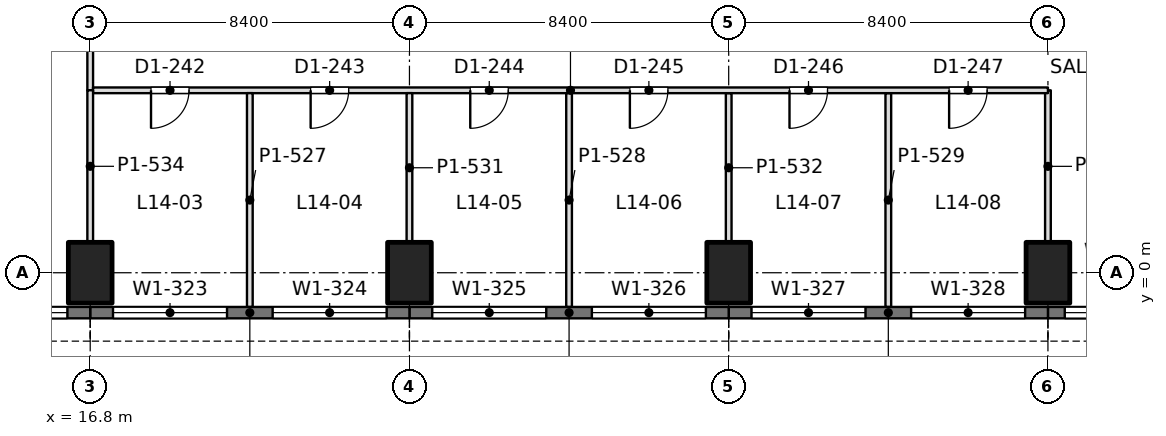
"""IFC4 building model, lengths in metres.
Left out: names, types, materials, properties, quantities, classifications, styles, units other than length and angle.
Written with IfcOpenShell. Run it as: python <this file> out.ifc"""

import sys

from ifc_helpers import new_model, si_unit, direction, frame, frame_2d, origin, origin_2d, place, context, subcontext, project, spatial, rectangle, extrude, element, fill, save


model = new_model("IFC4")
c1 = context("Model", 3, precision=1e-05, world=origin(), true_north=direction((0.0, 1.0)))
c2 = subcontext(c1, "Body", "Model", "MODEL_VIEW")
j1 = project(units=[si_unit("LENGTHUNIT", "METRE"), si_unit("PLANEANGLEUNIT", "RADIAN")], contexts=[c1])
p1 = place(None, origin())
s1 = spatial("IfcSite", under=j1, at=p1, CompositionType="ELEMENT")
p2 = place(p1, origin())
s2 = spatial("IfcBuilding", under=s1, at=p2, CompositionType="ELEMENT")
p3 = place(p2, frame((0.0, 0.0, 63.9)))
s3 = spatial("IfcBuildingStorey", under=s2, at=p3, CompositionType="ELEMENT", Elevation=63.9)
for number, where, z_axis, x_axis in (
    (1, (16.8, 0.0, 0.0), (0.0, 0.0, 1.0), (1.0, 0.0, 0.0)),
    (2, (25.2, 0.0, 0.0), (0.0, 0.0, 1.0), (1.0, 0.0, 0.0)),
    (3, (33.6, 0.0, 0.0), (0.0, 0.0, 1.0), (1.0, 0.0, 0.0)),
    (4, (42.0, 0.0, 0.0), (0.0, 0.0, 1.0), (1.0, 0.0, 0.0)),
):
    element("IfcColumn", number, at=place(p3, frame(where, z_axis=z_axis, x_axis=x_axis)), inside=s3, PredefinedType="COLUMN", context=c2, shape_type="SweptSolid", body=[
        extrude(rectangle(XDim=1.15, YDim=1.6, at=origin_2d()), origin(), (0.0, 0.0, 1.0), 4.5),
    ])
p4 = place(p3, frame((50.085, -1.05, 0.0), z_axis=(0.0, 0.0, 1.0), x_axis=(-1.0, 0.0, 0.0)))
e5 = element("IfcWall", 5, at=p4, inside=s3, PredefinedType="SOLIDWALL", context=c2, shape_type="SweptSolid", body=[
    extrude(rectangle(XDim=8.085, YDim=0.3, at=frame_2d((4.042, 0.0))), origin(), (0.0, 0.0, 1.0), 4.34),
])
p5 = place(p4, frame((0.443, 0.0, 0.9)))
e6 = element("IfcOpeningElement", 6, at=p5, cuts=e5, PredefinedType="OPENING", context=c2, shape_type="SweptSolid", body=[
    extrude(rectangle(XDim=3.0, YDim=1.9, at=frame_2d((1.5, 0.95))), frame((0.0, 0.16, 0.0), z_axis=(0.0, -1.0, 0.0), x_axis=(1.0, 0.0, 0.0)), (0.0, 0.0, 1.0), 0.32),
])
p6 = place(p4, frame((4.643, 0.0, 0.9)))
e7 = element("IfcOpeningElement", 7, at=p6, cuts=e5, PredefinedType="OPENING", context=c2, shape_type="SweptSolid", body=[
    extrude(rectangle(XDim=3.0, YDim=1.9, at=frame_2d((1.5, 0.95))), frame((0.0, 0.16, 0.0), z_axis=(0.0, -1.0, 0.0), x_axis=(1.0, 0.0, 0.0)), (0.0, 0.0, 1.0), 0.32),
])
p7 = place(p3, frame((42.0, -1.05, 0.0), z_axis=(0.0, 0.0, 1.0), x_axis=(-1.0, 0.0, 0.0)))
e8 = element("IfcWall", 8, at=p7, inside=s3, PredefinedType="SOLIDWALL", context=c2, shape_type="SweptSolid", body=[
    extrude(rectangle(XDim=8.4, YDim=0.3, at=frame_2d((4.2, 0.0))), origin(), (0.0, 0.0, 1.0), 4.34),
])
p8 = place(p7, frame((0.6, 0.0, 0.9)))
e9 = element("IfcOpeningElement", 9, at=p8, cuts=e8, PredefinedType="OPENING", context=c2, shape_type="SweptSolid", body=[
    extrude(rectangle(XDim=3.0, YDim=1.9, at=frame_2d((1.5, 0.95))), frame((0.0, 0.16, 0.0), z_axis=(0.0, -1.0, 0.0), x_axis=(1.0, 0.0, 0.0)), (0.0, 0.0, 1.0), 0.32),
])
p9 = place(p7, frame((4.8, 0.0, 0.9)))
e10 = element("IfcOpeningElement", 10, at=p9, cuts=e8, PredefinedType="OPENING", context=c2, shape_type="SweptSolid", body=[
    extrude(rectangle(XDim=3.0, YDim=1.9, at=frame_2d((1.5, 0.95))), frame((0.0, 0.16, 0.0), z_axis=(0.0, -1.0, 0.0), x_axis=(1.0, 0.0, 0.0)), (0.0, 0.0, 1.0), 0.32),
])
p10 = place(p3, frame((33.6, -1.05, 0.0), z_axis=(0.0, 0.0, 1.0), x_axis=(-1.0, 0.0, 0.0)))
e11 = element("IfcWall", 11, at=p10, inside=s3, PredefinedType="SOLIDWALL", context=c2, shape_type="SweptSolid", body=[
    extrude(rectangle(XDim=8.4, YDim=0.3, at=frame_2d((4.2, 0.0))), origin(), (0.0, 0.0, 1.0), 4.34),
])
p11 = place(p10, frame((0.6, 0.0, 0.9)))
e12 = element("IfcOpeningElement", 12, at=p11, cuts=e11, PredefinedType="OPENING", context=c2, shape_type="SweptSolid", body=[
    extrude(rectangle(XDim=3.0, YDim=1.9, at=frame_2d((1.5, 0.95))), frame((0.0, 0.16, 0.0), z_axis=(0.0, -1.0, 0.0), x_axis=(1.0, 0.0, 0.0)), (0.0, 0.0, 1.0), 0.32),
])
p12 = place(p10, frame((4.8, 0.0, 0.9)))
e13 = element("IfcOpeningElement", 13, at=p12, cuts=e11, PredefinedType="OPENING", context=c2, shape_type="SweptSolid", body=[
    extrude(rectangle(XDim=3.0, YDim=1.9, at=frame_2d((1.5, 0.95))), frame((0.0, 0.16, 0.0), z_axis=(0.0, -1.0, 0.0), x_axis=(1.0, 0.0, 0.0)), (0.0, 0.0, 1.0), 0.32),
])
p13 = place(p3, frame((25.2, -1.05, 0.0), z_axis=(0.0, 0.0, 1.0), x_axis=(-1.0, 0.0, 0.0)))
e14 = element("IfcWall", 14, at=p13, inside=s3, PredefinedType="SOLIDWALL", context=c2, shape_type="SweptSolid", body=[
    extrude(rectangle(XDim=8.4, YDim=0.3, at=frame_2d((4.2, 0.0))), origin(), (0.0, 0.0, 1.0), 4.34),
])
p14 = place(p13, frame((0.6, 0.0, 0.9)))
e15 = element("IfcOpeningElement", 15, at=p14, cuts=e14, PredefinedType="OPENING", context=c2, shape_type="SweptSolid", body=[
    extrude(rectangle(XDim=3.0, YDim=1.9, at=frame_2d((1.5, 0.95))), frame((0.0, 0.16, 0.0), z_axis=(0.0, -1.0, 0.0), x_axis=(1.0, 0.0, 0.0)), (0.0, 0.0, 1.0), 0.32),
])
p15 = place(p13, frame((4.8, 0.0, 0.9)))
e16 = element("IfcOpeningElement", 16, at=p15, cuts=e14, PredefinedType="OPENING", context=c2, shape_type="SweptSolid", body=[
    extrude(rectangle(XDim=3.0, YDim=1.9, at=frame_2d((1.5, 0.95))), frame((0.0, 0.16, 0.0), z_axis=(0.0, -1.0, 0.0), x_axis=(1.0, 0.0, 0.0)), (0.0, 0.0, 1.0), 0.32),
])
p16 = place(p3, frame((16.8, -1.05, 0.0), z_axis=(0.0, 0.0, 1.0), x_axis=(-1.0, 0.0, 0.0)))
e17 = element("IfcWall", 17, at=p16, inside=s3, PredefinedType="SOLIDWALL", context=c2, shape_type="SweptSolid", body=[
    extrude(rectangle(XDim=8.4, YDim=0.3, at=frame_2d((4.2, 0.0))), origin(), (0.0, 0.0, 1.0), 4.34),
])
p17 = place(p16, frame((0.6, 0.0, 0.9)))
e18 = element("IfcOpeningElement", 18, at=p17, cuts=e17, PredefinedType="OPENING", context=c2, shape_type="SweptSolid", body=[
    extrude(rectangle(XDim=3.0, YDim=1.9, at=frame_2d((1.5, 0.95))), frame((0.0, 0.16, 0.0), z_axis=(0.0, -1.0, 0.0), x_axis=(1.0, 0.0, 0.0)), (0.0, 0.0, 1.0), 0.32),
])
p18 = place(p16, frame((4.8, 0.0, 0.9)))
e19 = element("IfcOpeningElement", 19, at=p18, cuts=e17, PredefinedType="OPENING", context=c2, shape_type="SweptSolid", body=[
    extrude(rectangle(XDim=3.0, YDim=1.9, at=frame_2d((1.5, 0.95))), frame((0.0, 0.16, 0.0), z_axis=(0.0, -1.0, 0.0), x_axis=(1.0, 0.0, 0.0)), (0.0, 0.0, 1.0), 0.32),
])
p19 = place(p3, frame((16.874, 4.8, 0.0), z_axis=(0.0, 0.0, 1.0), x_axis=(1.0, 0.0, 0.0)))
e20 = element("IfcWall", 20, at=p19, inside=s3, PredefinedType="PARTITIONING", context=c2, shape_type="SweptSolid", body=[
    extrude(rectangle(XDim=25.126, YDim=0.15, at=frame_2d((12.563, 0.0))), origin(), (0.0, 0.0, 1.0), 3.74),
])
p20 = place(p19, frame((1.526, 0.0, 0.0)))
e21 = element("IfcOpeningElement", 21, at=p20, cuts=e20, PredefinedType="OPENING", context=c2, shape_type="SweptSolid", body=[
    extrude(rectangle(XDim=1.0, YDim=2.2, at=frame_2d((0.5, 1.1))), frame((0.0, 0.085, 0.0), z_axis=(0.0, -1.0, 0.0), x_axis=(1.0, 0.0, 0.0)), (0.0, 0.0, 1.0), 0.17),
])
p21 = place(p19, frame((5.726, 0.0, 0.0)))
e22 = element("IfcOpeningElement", 22, at=p21, cuts=e20, PredefinedType="OPENING", context=c2, shape_type="SweptSolid", body=[
    extrude(rectangle(XDim=1.0, YDim=2.2, at=frame_2d((0.5, 1.1))), frame((0.0, 0.085, 0.0), z_axis=(0.0, -1.0, 0.0), x_axis=(1.0, 0.0, 0.0)), (0.0, 0.0, 1.0), 0.17),
])
p22 = place(p19, frame((9.926, 0.0, 0.0)))
e23 = element("IfcOpeningElement", 23, at=p22, cuts=e20, PredefinedType="OPENING", context=c2, shape_type="SweptSolid", body=[
    extrude(rectangle(XDim=1.0, YDim=2.2, at=frame_2d((0.5, 1.1))), frame((0.0, 0.085, 0.0), z_axis=(0.0, -1.0, 0.0), x_axis=(1.0, 0.0, 0.0)), (0.0, 0.0, 1.0), 0.17),
])
p23 = place(p19, frame((14.126, 0.0, 0.0)))
e24 = element("IfcOpeningElement", 24, at=p23, cuts=e20, PredefinedType="OPENING", context=c2, shape_type="SweptSolid", body=[
    extrude(rectangle(XDim=1.0, YDim=2.2, at=frame_2d((0.5, 1.1))), frame((0.0, 0.085, 0.0), z_axis=(0.0, -1.0, 0.0), x_axis=(1.0, 0.0, 0.0)), (0.0, 0.0, 1.0), 0.17),
])
p24 = place(p19, frame((18.326, 0.0, 0.0)))
e25 = element("IfcOpeningElement", 25, at=p24, cuts=e20, PredefinedType="OPENING", context=c2, shape_type="SweptSolid", body=[
    extrude(rectangle(XDim=1.0, YDim=2.2, at=frame_2d((0.5, 1.1))), frame((0.0, 0.085, 0.0), z_axis=(0.0, -1.0, 0.0), x_axis=(1.0, 0.0, 0.0)), (0.0, 0.0, 1.0), 0.17),
])
p25 = place(p19, frame((22.526, 0.0, 0.0)))
e26 = element("IfcOpeningElement", 26, at=p25, cuts=e20, PredefinedType="OPENING", context=c2, shape_type="SweptSolid", body=[
    extrude(rectangle(XDim=1.0, YDim=2.2, at=frame_2d((0.5, 1.1))), frame((0.0, 0.085, 0.0), z_axis=(0.0, -1.0, 0.0), x_axis=(1.0, 0.0, 0.0)), (0.0, 0.0, 1.0), 0.17),
])
p26 = place(p3, frame((16.8, 0.799, 0.0), z_axis=(0.0, 0.0, 1.0), x_axis=(0.0, 1.0, 0.0)))
e27 = element("IfcWall", 27, at=p26, inside=s3, PredefinedType="PARTITIONING", context=c2, shape_type="SweptSolid", body=[
    extrude(rectangle(XDim=4.003, YDim=0.15, at=frame_2d((2.001, 0.0))), origin(), (0.0, 0.0, 1.0), 3.74),
])
p27 = place(p3, frame((21.0, -0.902, 0.0), z_axis=(0.0, 0.0, 1.0), x_axis=(0.0, 1.0, 0.0)))
e28 = element("IfcWall", 28, at=p27, inside=s3, PredefinedType="PARTITIONING", context=c2, shape_type="SweptSolid", body=[
    extrude(rectangle(XDim=5.628, YDim=0.15, at=frame_2d((2.814, 0.0))), origin(), (0.0, 0.0, 1.0), 3.84),
])
p28 = place(p3, frame((25.2, 0.799, 0.0), z_axis=(0.0, 0.0, 1.0), x_axis=(0.0, 1.0, 0.0)))
e29 = element("IfcWall", 29, at=p28, inside=s3, PredefinedType="PARTITIONING", context=c2, shape_type="SweptSolid", body=[
    extrude(rectangle(XDim=3.927, YDim=0.15, at=frame_2d((1.963, 0.0))), origin(), (0.0, 0.0, 1.0), 3.74),
])
p29 = place(p3, frame((29.4, -0.902, 0.0), z_axis=(0.0, 0.0, 1.0), x_axis=(0.0, 1.0, 0.0)))
e30 = element("IfcWall", 30, at=p29, inside=s3, PredefinedType="PARTITIONING", context=c2, shape_type="SweptSolid", body=[
    extrude(rectangle(XDim=5.628, YDim=0.15, at=frame_2d((2.814, 0.0))), origin(), (0.0, 0.0, 1.0), 3.84),
])
p30 = place(p3, frame((33.6, 0.799, 0.0), z_axis=(0.0, 0.0, 1.0), x_axis=(0.0, 1.0, 0.0)))
e31 = element("IfcWall", 31, at=p30, inside=s3, PredefinedType="PARTITIONING", context=c2, shape_type="SweptSolid", body=[
    extrude(rectangle(XDim=3.927, YDim=0.15, at=frame_2d((1.963, 0.0))), origin(), (0.0, 0.0, 1.0), 3.74),
])
p31 = place(p3, frame((37.8, -0.902, 0.0), z_axis=(0.0, 0.0, 1.0), x_axis=(0.0, 1.0, 0.0)))
e32 = element("IfcWall", 32, at=p31, inside=s3, PredefinedType="PARTITIONING", context=c2, shape_type="SweptSolid", body=[
    extrude(rectangle(XDim=5.628, YDim=0.15, at=frame_2d((2.814, 0.0))), origin(), (0.0, 0.0, 1.0), 3.84),
])
p32 = place(p3, frame((42.0, 0.799, 0.0), z_axis=(0.0, 0.0, 1.0), x_axis=(0.0, 1.0, 0.0)))
e33 = element("IfcWall", 33, at=p32, inside=s3, PredefinedType="PARTITIONING", context=c2, shape_type="SweptSolid", body=[
    extrude(rectangle(XDim=4.001, YDim=0.15, at=frame_2d((2.0, 0.0))), origin(), (0.0, 0.0, 1.0), 3.74),
])
p33 = place(p3, frame((16.8, 4.798, 0.0), z_axis=(0.0, 0.0, 1.0), x_axis=(0.0, 1.0, 0.0)))
e34 = element("IfcWall", 34, at=p33, inside=s3, PredefinedType="PARTITIONING", context=c2, shape_type="SweptSolid", body=[
    extrude(rectangle(XDim=2.703, YDim=0.15, at=frame_2d((1.352, 0.0))), origin(), (0.0, 0.0, 1.0), 3.74),
])
p34 = place(p6, origin())
e35 = element("IfcWindow", 35, at=p34, inside=s3, PartitioningType="SINGLE_PANEL", PredefinedType="WINDOW", context=c2, shape_type="SweptSolid", body=[
    extrude(rectangle(XDim=3.0, YDim=1.9, at=frame_2d((1.5, 0.95))), frame((0.0, 0.03, 0.0), z_axis=(0.0, -1.0, 0.0), x_axis=(1.0, 0.0, 0.0)), (0.0, 0.0, 1.0), 0.06),
])
fill(e7, e35)
p35 = place(p8, origin())
e36 = element("IfcWindow", 36, at=p35, inside=s3, PartitioningType="SINGLE_PANEL", PredefinedType="WINDOW", context=c2, shape_type="SweptSolid", body=[
    extrude(rectangle(XDim=3.0, YDim=1.9, at=frame_2d((1.5, 0.95))), frame((0.0, 0.03, 0.0), z_axis=(0.0, -1.0, 0.0), x_axis=(1.0, 0.0, 0.0)), (0.0, 0.0, 1.0), 0.06),
])
fill(e9, e36)
p36 = place(p9, origin())
e37 = element("IfcWindow", 37, at=p36, inside=s3, PartitioningType="SINGLE_PANEL", PredefinedType="WINDOW", context=c2, shape_type="SweptSolid", body=[
    extrude(rectangle(XDim=3.0, YDim=1.9, at=frame_2d((1.5, 0.95))), frame((0.0, 0.03, 0.0), z_axis=(0.0, -1.0, 0.0), x_axis=(1.0, 0.0, 0.0)), (0.0, 0.0, 1.0), 0.06),
])
fill(e10, e37)
p37 = place(p11, origin())
e38 = element("IfcWindow", 38, at=p37, inside=s3, PartitioningType="SINGLE_PANEL", PredefinedType="WINDOW", context=c2, shape_type="SweptSolid", body=[
    extrude(rectangle(XDim=3.0, YDim=1.9, at=frame_2d((1.5, 0.95))), frame((0.0, 0.03, 0.0), z_axis=(0.0, -1.0, 0.0), x_axis=(1.0, 0.0, 0.0)), (0.0, 0.0, 1.0), 0.06),
])
fill(e12, e38)
p38 = place(p12, origin())
e39 = element("IfcWindow", 39, at=p38, inside=s3, PartitioningType="SINGLE_PANEL", PredefinedType="WINDOW", context=c2, shape_type="SweptSolid", body=[
    extrude(rectangle(XDim=3.0, YDim=1.9, at=frame_2d((1.5, 0.95))), frame((0.0, 0.03, 0.0), z_axis=(0.0, -1.0, 0.0), x_axis=(1.0, 0.0, 0.0)), (0.0, 0.0, 1.0), 0.06),
])
fill(e13, e39)
p39 = place(p14, origin())
e40 = element("IfcWindow", 40, at=p39, inside=s3, PartitioningType="SINGLE_PANEL", PredefinedType="WINDOW", context=c2, shape_type="SweptSolid", body=[
    extrude(rectangle(XDim=3.0, YDim=1.9, at=frame_2d((1.5, 0.95))), frame((0.0, 0.03, 0.0), z_axis=(0.0, -1.0, 0.0), x_axis=(1.0, 0.0, 0.0)), (0.0, 0.0, 1.0), 0.06),
])
fill(e15, e40)
p40 = place(p15, origin())
e41 = element("IfcWindow", 41, at=p40, inside=s3, PartitioningType="SINGLE_PANEL", PredefinedType="WINDOW", context=c2, shape_type="SweptSolid", body=[
    extrude(rectangle(XDim=3.0, YDim=1.9, at=frame_2d((1.5, 0.95))), frame((0.0, 0.03, 0.0), z_axis=(0.0, -1.0, 0.0), x_axis=(1.0, 0.0, 0.0)), (0.0, 0.0, 1.0), 0.06),
])
fill(e16, e41)
p41 = place(p17, origin())
e42 = element("IfcWindow", 42, at=p41, inside=s3, PartitioningType="SINGLE_PANEL", PredefinedType="WINDOW", context=c2, shape_type="SweptSolid", body=[
    extrude(rectangle(XDim=3.0, YDim=1.9, at=frame_2d((1.5, 0.95))), frame((0.0, 0.03, 0.0), z_axis=(0.0, -1.0, 0.0), x_axis=(1.0, 0.0, 0.0)), (0.0, 0.0, 1.0), 0.06),
])
fill(e18, e42)
p42 = place(p20, frame((1.0, 0.0, 0.0), z_axis=(0.0, 0.0, 1.0), x_axis=(-1.0, 0.0, 0.0)))
e43 = element("IfcDoor", 43, at=p42, inside=s3, OperationType="SINGLE_SWING_RIGHT", PredefinedType="DOOR", context=c2, shape_type="SweptSolid", body=[
    extrude(rectangle(XDim=1.0, YDim=2.2, at=frame_2d((0.5, 1.1))), frame((0.0, 0.025, 0.0), z_axis=(0.0, -1.0, 0.0), x_axis=(1.0, 0.0, 0.0)), (0.0, 0.0, 1.0), 0.05),
])
fill(e21, e43)
p43 = place(p21, frame((1.0, 0.0, 0.0), z_axis=(0.0, 0.0, 1.0), x_axis=(-1.0, 0.0, 0.0)))
e44 = element("IfcDoor", 44, at=p43, inside=s3, OperationType="SINGLE_SWING_RIGHT", PredefinedType="DOOR", context=c2, shape_type="SweptSolid", body=[
    extrude(rectangle(XDim=1.0, YDim=2.2, at=frame_2d((0.5, 1.1))), frame((0.0, 0.025, 0.0), z_axis=(0.0, -1.0, 0.0), x_axis=(1.0, 0.0, 0.0)), (0.0, 0.0, 1.0), 0.05),
])
fill(e22, e44)
p44 = place(p22, frame((1.0, 0.0, 0.0), z_axis=(0.0, 0.0, 1.0), x_axis=(-1.0, 0.0, 0.0)))
e45 = element("IfcDoor", 45, at=p44, inside=s3, OperationType="SINGLE_SWING_RIGHT", PredefinedType="DOOR", context=c2, shape_type="SweptSolid", body=[
    extrude(rectangle(XDim=1.0, YDim=2.2, at=frame_2d((0.5, 1.1))), frame((0.0, 0.025, 0.0), z_axis=(0.0, -1.0, 0.0), x_axis=(1.0, 0.0, 0.0)), (0.0, 0.0, 1.0), 0.05),
])
fill(e23, e45)
p45 = place(p23, frame((1.0, 0.0, 0.0), z_axis=(0.0, 0.0, 1.0), x_axis=(-1.0, 0.0, 0.0)))
e46 = element("IfcDoor", 46, at=p45, inside=s3, OperationType="SINGLE_SWING_RIGHT", PredefinedType="DOOR", context=c2, shape_type="SweptSolid", body=[
    extrude(rectangle(XDim=1.0, YDim=2.2, at=frame_2d((0.5, 1.1))), frame((0.0, 0.025, 0.0), z_axis=(0.0, -1.0, 0.0), x_axis=(1.0, 0.0, 0.0)), (0.0, 0.0, 1.0), 0.05),
])
fill(e24, e46)
p46 = place(p24, frame((1.0, 0.0, 0.0), z_axis=(0.0, 0.0, 1.0), x_axis=(-1.0, 0.0, 0.0)))
e47 = element("IfcDoor", 47, at=p46, inside=s3, OperationType="SINGLE_SWING_RIGHT", PredefinedType="DOOR", context=c2, shape_type="SweptSolid", body=[
    extrude(rectangle(XDim=1.0, YDim=2.2, at=frame_2d((0.5, 1.1))), frame((0.0, 0.025, 0.0), z_axis=(0.0, -1.0, 0.0), x_axis=(1.0, 0.0, 0.0)), (0.0, 0.0, 1.0), 0.05),
])
fill(e25, e47)
p47 = place(p25, frame((1.0, 0.0, 0.0), z_axis=(0.0, 0.0, 1.0), x_axis=(-1.0, 0.0, 0.0)))
e48 = element("IfcDoor", 48, at=p47, inside=s3, OperationType="SINGLE_SWING_RIGHT", PredefinedType="DOOR", context=c2, shape_type="SweptSolid", body=[
    extrude(rectangle(XDim=1.0, YDim=2.2, at=frame_2d((0.5, 1.1))), frame((0.0, 0.025, 0.0), z_axis=(0.0, -1.0, 0.0), x_axis=(1.0, 0.0, 0.0)), (0.0, 0.0, 1.0), 0.05),
])
fill(e26, e48)
save(model, sys.argv[1])
